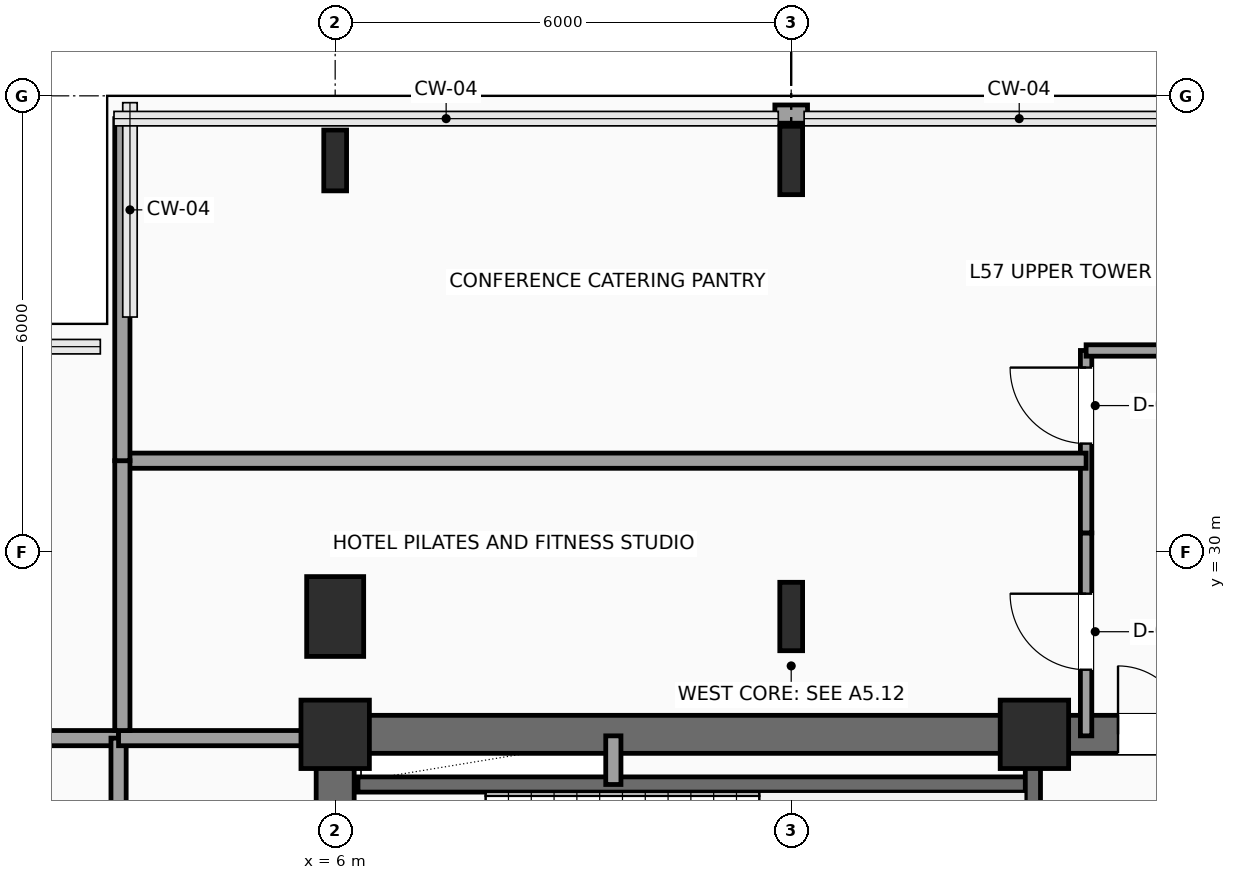
"""IFC4 building model, lengths in metres.
Left out: names, types, materials, properties, quantities, classifications, styles, units other than length and angle.
Written with IfcOpenShell. Run it as: python <this file> out.ifc"""

import sys

from ifc_helpers import new_model, si_unit, direction, frame, frame_2d, origin, origin_2d, place, context, subcontext, project, spatial, rectangle, i_section, extrude, element, fill, save


model = new_model("IFC4")
c1 = context("Model", 3, precision=1e-05, world=origin(), true_north=direction((0.0, 1.0)))
c2 = subcontext(c1, "Body", "Model", "MODEL_VIEW")
j1 = project(units=[si_unit("LENGTHUNIT", "METRE"), si_unit("PLANEANGLEUNIT", "RADIAN")], contexts=[c1])
p1 = place(None, origin())
s1 = spatial("IfcSite", under=j1, at=p1, CompositionType="ELEMENT")
p2 = place(p1, origin())
s2 = spatial("IfcBuilding", under=s1, at=p2, CompositionType="ELEMENT")
p3 = place(p2, frame((0.0, 0.0, 231.15)))
s3 = spatial("IfcBuildingStorey", under=s2, at=p3, CompositionType="ELEMENT", Elevation=231.15)
for number, where, z_axis, x_axis in (
    (1, (6.0, 27.6, 0.0), (0.0, 0.0, 1.0), (1.0, 0.0, 0.0)),
    (2, (15.2, 27.6, 0.0), (0.0, 0.0, 1.0), (1.0, 0.0, 0.0)),
):
    element("IfcColumn", number, at=place(p3, frame(where, z_axis=z_axis, x_axis=x_axis)), inside=s3, PredefinedType="COLUMN", context=c2, shape_type="SweptSolid", body=[
        extrude(rectangle(XDim=0.9, YDim=0.9, at=origin_2d()), origin(), (0.0, 0.0, 1.0), 3.75),
    ])
p4 = place(p3, frame((6.0, 29.15, 0.0), z_axis=(0.0, 0.0, 1.0), x_axis=(1.0, 0.0, 0.0)))
e3 = element("IfcColumn", 3, at=p4, inside=s3, PredefinedType="COLUMN", context=c2, shape_type="SweptSolid", body=[
    extrude(rectangle(XDim=0.75, YDim=1.05, at=origin_2d()), origin(), (0.0, 0.0, 1.0), 3.75),
])
p5 = place(p3, frame((6.0, 35.15, 0.0), z_axis=(0.0, 0.0, 1.0), x_axis=(1.0, 0.0, 0.0)))
e4 = element("IfcColumn", 4, at=p5, inside=s3, PredefinedType="COLUMN", context=c2, shape_type="SweptSolid", body=[
    extrude(i_section(OverallWidth=0.3, OverallDepth=0.8, WebThickness=0.018, FlangeThickness=0.033, FilletRadius=0.03, at=origin_2d()), origin(), (0.0, 0.0, 1.0), 3.75),
])
for number, where, z_axis, x_axis in (
    (5, (12.0, 29.15, 0.0), (0.0, 0.0, 1.0), (1.0, 0.0, 0.0)),
    (6, (12.0, 35.15, 0.0), (0.0, 0.0, 1.0), (1.0, 0.0, 0.0)),
):
    element("IfcColumn", number, at=place(p3, frame(where, z_axis=z_axis, x_axis=x_axis)), inside=s3, PredefinedType="COLUMN", context=c2, shape_type="SweptSolid", body=[
        extrude(i_section(OverallWidth=0.3, OverallDepth=0.9, WebThickness=0.019, FlangeThickness=0.035, FilletRadius=0.03, at=origin_2d()), origin(), (0.0, 0.0, 1.0), 3.75),
    ])
p6 = place(p3, frame((11.785, 35.76, 0.0), z_axis=(0.0, 0.0, 1.0), x_axis=(1.0, 0.0, 0.0)))
e7 = element("IfcWall", 7, at=p6, inside=s3, PredefinedType="SOLIDWALL", context=c2, shape_type="SweptSolid", body=[
    extrude(rectangle(XDim=0.43, YDim=0.24, at=frame_2d((0.215, 0.0))), origin(), (0.0, 0.0, 1.0), 3.425),
])
p7 = place(p3, frame((6.0, 27.6, 0.0), z_axis=(0.0, 0.0, 1.0), x_axis=(1.0, 0.0, 0.0)))
e8 = element("IfcWall", 8, at=p7, inside=s3, PredefinedType="SHEAR", context=c2, shape_type="SweptSolid", body=[
    extrude(rectangle(XDim=12.0, YDim=0.5, at=frame_2d((6.0, 0.0))), origin(), (0.0, 0.0, 1.0), 3.425),
])
p8 = place(p7, frame((10.3, 0.0, 0.0)))
e9 = element("IfcOpeningElement", 9, at=p8, cuts=e8, PredefinedType="OPENING", context=c2, shape_type="SweptSolid", body=[
    extrude(rectangle(XDim=0.9, YDim=2.15, at=frame_2d((0.45, 1.075))), frame((0.0, 0.26, 0.0), z_axis=(0.0, -1.0, 0.0), x_axis=(1.0, 0.0, 0.0)), (0.0, 0.0, 1.0), 0.52),
])
p9 = place(p3, frame((6.0, 18.0, 0.0), z_axis=(0.0, 0.0, 1.0), x_axis=(0.0, 1.0, 0.0)))
e10 = element("IfcWall", 10, at=p9, inside=s3, PredefinedType="SHEAR", context=c2, shape_type="SweptSolid", body=[
    extrude(rectangle(XDim=9.6, YDim=0.5, at=frame_2d((4.8, 0.0))), origin(), (0.0, 0.0, 1.0), 3.425),
])
p10 = place(p3, frame((6.3, 26.94, 0.0), z_axis=(0.0, 0.0, 1.0), x_axis=(1.0, 0.0, 0.0)))
e11 = element("IfcWall", 11, at=p10, inside=s3, PredefinedType="SHEAR", context=c2, shape_type="SweptSolid", body=[
    extrude(rectangle(XDim=8.88, YDim=0.2, at=frame_2d((4.44, 0.0))), origin(), (0.0, 0.0, 1.0), 3.425),
])
p11 = place(p3, frame((15.18, 23.26, 0.0), z_axis=(0.0, 0.0, 1.0), x_axis=(0.0, 1.0, 0.0)))
e12 = element("IfcWall", 12, at=p11, inside=s3, PredefinedType="SHEAR", context=c2, shape_type="SweptSolid", body=[
    extrude(rectangle(XDim=4.04, YDim=0.2, at=frame_2d((2.02, 0.0))), origin(), (0.0, 0.0, 1.0), 3.425),
])
p12 = place(p3, frame((9.66, 26.94, 0.0), z_axis=(0.0, 0.0, 1.0), x_axis=(0.0, 1.0, 0.0)))
e13 = element("IfcWall", 13, at=p12, inside=s3, PredefinedType="SOLIDWALL", context=c2, shape_type="SweptSolid", body=[
    extrude(rectangle(XDim=0.64, YDim=0.2, at=frame_2d((0.32, 0.0))), origin(), (0.0, 0.0, 1.0), 3.425),
])
p13 = place(p3, frame((15.88, 27.58, 0.0), z_axis=(0.0, 0.0, 1.0), x_axis=(0.0, 1.0, 0.0)))
e14 = element("IfcWall", 14, at=p13, inside=s3, PredefinedType="PARTITIONING", context=c2, shape_type="SweptSolid", body=[
    extrude(rectangle(XDim=2.67, YDim=0.15, at=frame_2d((1.335, 0.0))), origin(), (0.0, 0.0, 1.0), 3.425),
])
p14 = place(p13, frame((0.87, 0.0, 0.0)))
e15 = element("IfcOpeningElement", 15, at=p14, cuts=e14, PredefinedType="OPENING", context=c2, shape_type="SweptSolid", body=[
    extrude(rectangle(XDim=1.0, YDim=2.2, at=frame_2d((0.5, 1.1))), frame((0.0, 0.085, 0.0), z_axis=(0.0, -1.0, 0.0), x_axis=(1.0, 0.0, 0.0)), (0.0, 0.0, 1.0), 0.17),
])
p15 = place(p3, frame((15.88, 30.25, 0.0), z_axis=(0.0, 0.0, 1.0), x_axis=(0.0, 1.0, 0.0)))
e16 = element("IfcWall", 16, at=p15, inside=s3, PredefinedType="PARTITIONING", context=c2, shape_type="SweptSolid", body=[
    extrude(rectangle(XDim=2.4, YDim=0.15, at=frame_2d((1.2, 0.0))), origin(), (0.0, 0.0, 1.0), 3.425),
])
p16 = place(p15, frame((1.175, 0.0, 0.0)))
e17 = element("IfcOpeningElement", 17, at=p16, cuts=e16, PredefinedType="OPENING", context=c2, shape_type="SweptSolid", body=[
    extrude(rectangle(XDim=1.0, YDim=2.2, at=frame_2d((0.5, 1.1))), frame((0.0, 0.085, 0.0), z_axis=(0.0, -1.0, 0.0), x_axis=(1.0, 0.0, 0.0)), (0.0, 0.0, 1.0), 0.17),
])
p17 = place(p3, frame((15.88, 32.65, 0.0), z_axis=(0.0, 0.0, 1.0), x_axis=(1.0, 0.0, 0.0)))
e18 = element("IfcWall", 18, at=p17, inside=s3, PredefinedType="PARTITIONING", context=c2, shape_type="SweptSolid", body=[
    extrude(rectangle(XDim=2.22, YDim=0.15, at=frame_2d((1.11, 0.0))), origin(), (0.0, 0.0, 1.0), 3.425),
])
p18 = place(p3, frame((0.3, 27.55, 0.0), z_axis=(0.0, 0.0, 1.0), x_axis=(1.0, 0.0, 0.0)))
e19 = element("IfcWall", 19, at=p18, inside=s3, PredefinedType="PARTITIONING", context=c2, shape_type="SweptSolid", body=[
    extrude(rectangle(XDim=2.85, YDim=0.2, at=frame_2d((1.425, 0.0))), origin(), (0.0, 0.0, 1.0), 3.425),
])
p19 = place(p3, frame((3.15, 16.15, 0.0), z_axis=(0.0, 0.0, 1.0), x_axis=(0.0, 1.0, 0.0)))
e20 = element("IfcWall", 20, at=p19, inside=s3, PredefinedType="PARTITIONING", context=c2, shape_type="SweptSolid", body=[
    extrude(rectangle(XDim=11.4, YDim=0.2, at=frame_2d((5.7, 0.0))), origin(), (0.0, 0.0, 1.0), 3.425),
])
p20 = place(p3, frame((3.15, 27.55, 0.0), z_axis=(0.0, 0.0, 1.0), x_axis=(1.0, 0.0, 0.0)))
e21 = element("IfcWall", 21, at=p20, inside=s3, PredefinedType="PARTITIONING", context=c2, shape_type="SweptSolid", body=[
    extrude(rectangle(XDim=2.8, YDim=0.2, at=frame_2d((1.4, 0.0))), origin(), (0.0, 0.0, 1.0), 3.425),
])
p21 = place(p3, frame((3.2, 31.2, 0.0), z_axis=(0.0, 0.0, 1.0), x_axis=(1.0, 0.0, 0.0)))
e22 = element("IfcWall", 22, at=p21, inside=s3, PredefinedType="PARTITIONING", context=c2, shape_type="SweptSolid", body=[
    extrude(rectangle(XDim=12.68, YDim=0.2, at=frame_2d((6.34, 0.0))), origin(), (0.0, 0.0, 1.0), 3.425),
])
p22 = place(p3, frame((3.2, 27.65, 0.0), z_axis=(0.0, 0.0, 1.0), x_axis=(0.0, 1.0, 0.0)))
e23 = element("IfcWall", 23, at=p22, inside=s3, PredefinedType="PARTITIONING", context=c2, shape_type="SweptSolid", body=[
    extrude(rectangle(XDim=3.55, YDim=0.2, at=frame_2d((1.775, 0.0))), origin(), (0.0, 0.0, 1.0), 3.425),
])
p23 = place(p3, frame((3.2, 31.2, 0.0), z_axis=(0.0, 0.0, 1.0), x_axis=(0.0, 1.0, 0.0)))
e24 = element("IfcWall", 24, at=p23, inside=s3, PredefinedType="PARTITIONING", context=c2, shape_type="SweptSolid", body=[
    extrude(rectangle(XDim=4.5, YDim=0.2, at=frame_2d((2.25, 0.0))), origin(), (0.0, 0.0, 1.0), 3.425),
])
p24 = place(p8, origin())
e25 = element("IfcDoor", 25, at=p24, inside=s3, OperationType="SINGLE_SWING_LEFT", PredefinedType="DOOR", context=c2, shape_type="SweptSolid", body=[
    extrude(rectangle(XDim=0.9, YDim=2.15, at=frame_2d((0.45, 1.075))), frame((0.0, 0.025, 0.0), z_axis=(0.0, -1.0, 0.0), x_axis=(1.0, 0.0, 0.0)), (0.0, 0.0, 1.0), 0.05),
])
fill(e9, e25)
p25 = place(p14, origin())
e26 = element("IfcDoor", 26, at=p25, inside=s3, OperationType="SINGLE_SWING_RIGHT", PredefinedType="DOOR", context=c2, shape_type="SweptSolid", body=[
    extrude(rectangle(XDim=1.0, YDim=2.2, at=frame_2d((0.5, 1.1))), frame((0.0, 0.025, 0.0), z_axis=(0.0, -1.0, 0.0), x_axis=(1.0, 0.0, 0.0)), (0.0, 0.0, 1.0), 0.05),
])
fill(e15, e26)
p26 = place(p16, origin())
e27 = element("IfcDoor", 27, at=p26, inside=s3, OperationType="SINGLE_SWING_RIGHT", PredefinedType="DOOR", context=c2, shape_type="SweptSolid", body=[
    extrude(rectangle(XDim=1.0, YDim=2.2, at=frame_2d((0.5, 1.1))), frame((0.0, 0.025, 0.0), z_axis=(0.0, -1.0, 0.0), x_axis=(1.0, 0.0, 0.0)), (0.0, 0.0, 1.0), 0.05),
])
fill(e17, e27)
save(model, sys.argv[1])
